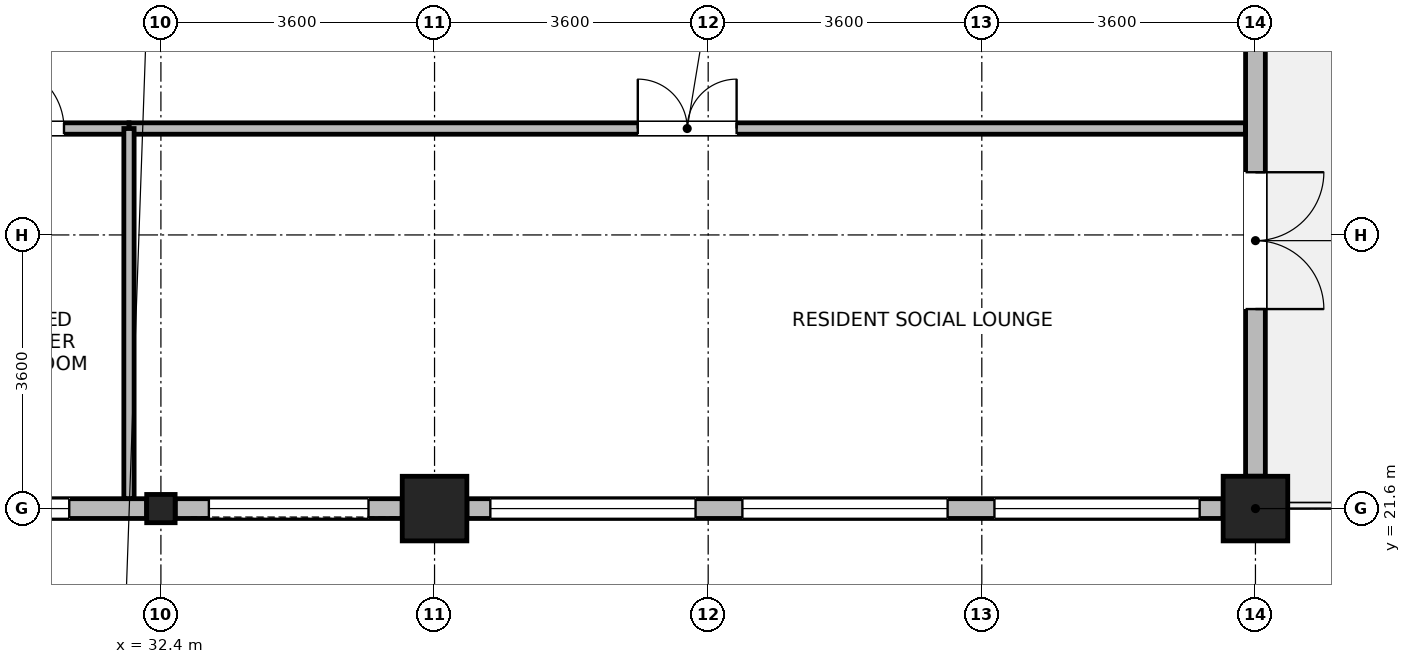
"""IFC4 building model, lengths in metres.
Left out: names, types, materials, properties, quantities, classifications, styles, units other than length and angle.
Written with IfcOpenShell. Run it as: python <this file> out.ifc"""

import sys

from ifc_helpers import new_model, si_unit, direction, frame, frame_2d, origin, origin_2d, place, context, subcontext, project, spatial, rectangle, i_section, extrude, source, transform, mapped, element, fill, save


model = new_model("IFC4")
c1 = context("Model", 3, precision=1e-05, world=origin(), true_north=direction((0.0, 1.0)))
c2 = subcontext(c1, "Body", "Model", "MODEL_VIEW")
j1 = project(units=[si_unit("LENGTHUNIT", "METRE"), si_unit("PLANEANGLEUNIT", "RADIAN")], contexts=[c1])
p1 = place(None, origin())
s1 = spatial("IfcSite", under=j1, at=p1, CompositionType="ELEMENT")
p2 = place(p1, origin())
s2 = spatial("IfcBuilding", under=s1, at=p2, CompositionType="ELEMENT")
p3 = place(p2, frame((0.0, 0.0, 249.9)))
s3 = spatial("IfcBuildingStorey", under=s2, at=p3, CompositionType="ELEMENT", Elevation=249.9)
m1 = source(origin(), c2, "Body", "SweptSolid", [
    extrude(rectangle(XDim=0.85, YDim=0.85, at=origin_2d()), origin(), (0.0, 0.0, 1.0), 3.7),
])
for number, where, z_axis, x_axis in (
    (1, (36.0, 21.6, 0.0), (0.0, 0.0, 1.0), (1.0, 0.0, 0.0)),
    (2, (46.8, 21.6, 0.0), (0.0, 0.0, 1.0), (1.0, 0.0, 0.0)),
):
    element("IfcColumn", number, at=place(p3, frame(where, z_axis=z_axis, x_axis=x_axis)), inside=s3, PredefinedType="COLUMN", context=c2, shape_type="MappedRepresentation", body=[
        mapped(m1, transform((0.0, 0.0, 0.0), x_axis=(1.0, 0.0, 0.0), y_axis=(0.0, 1.0, 0.0), z_axis=(0.0, 0.0, 1.0), scale=1.0)),
    ])
m2 = source(origin(), c2, "Body", "SweptSolid", [
    extrude(i_section(OverallWidth=0.374, OverallDepth=0.372, WebThickness=0.015, FlangeThickness=0.026, FilletRadius=0.015, at=origin_2d()), origin(), (0.0, 0.0, 1.0), 3.7),
])
p4 = place(p3, frame((32.4, 21.6, 0.0), z_axis=(0.0, 0.0, 1.0), x_axis=(1.0, 0.0, 0.0)))
e3 = element("IfcColumn", 3, at=p4, inside=s3, PredefinedType="COLUMN", context=c2, shape_type="MappedRepresentation", body=[
    mapped(m2, transform((0.0, 0.0, 0.0), x_axis=(1.0, 0.0, 0.0), y_axis=(0.0, 1.0, 0.0), z_axis=(0.0, 0.0, 1.0), scale=1.0)),
])
p5 = place(p3, frame((32.212, 21.6, 0.0), z_axis=(0.0, 0.0, 1.0), x_axis=(-1.0, 0.0, 0.0)))
e4 = element("IfcWall", 4, at=p5, inside=s3, PredefinedType="STANDARD", context=c2, shape_type="SweptSolid", body=[
    extrude(rectangle(XDim=2.986, YDim=0.26, at=frame_2d((1.493, 0.0))), origin(), (0.0, 0.0, 1.0), 3.055),
])
p6 = place(p5, frame((1.018, 0.0, 0.85)))
e5 = element("IfcOpeningElement", 5, at=p6, cuts=e4, PredefinedType="OPENING", context=c2, shape_type="SweptSolid", body=[
    extrude(rectangle(XDim=0.95, YDim=1.75, at=frame_2d((0.475, 0.875))), frame((0.0, 0.14, 0.0), z_axis=(0.0, -1.0, 0.0), x_axis=(1.0, 0.0, 0.0)), (0.0, 0.0, 1.0), 0.28),
])
p7 = place(p3, frame((35.574, 21.6, 0.0), z_axis=(0.0, 0.0, 1.0), x_axis=(-1.0, 0.0, 0.0)))
e6 = element("IfcWall", 6, at=p7, inside=s3, PredefinedType="STANDARD", context=c2, shape_type="SweptSolid", body=[
    extrude(rectangle(XDim=2.986, YDim=0.26, at=frame_2d((1.493, 0.0))), origin(), (0.0, 0.0, 1.0), 3.055),
])
p8 = place(p7, frame((0.443, 0.0, 0.85)))
e7 = element("IfcOpeningElement", 7, at=p8, cuts=e6, PredefinedType="OPENING", context=c2, shape_type="SweptSolid", body=[
    extrude(rectangle(XDim=2.1, YDim=1.95, at=frame_2d((1.05, 0.975))), frame((0.0, 0.14, 0.0), z_axis=(0.0, -1.0, 0.0), x_axis=(1.0, 0.0, 0.0)), (0.0, 0.0, 1.0), 0.28),
])
p9 = place(p3, frame((46.374, 21.6, 0.0), z_axis=(0.0, 0.0, 1.0), x_axis=(-1.0, 0.0, 0.0)))
e8 = element("IfcWall", 8, at=p9, inside=s3, PredefinedType="STANDARD", context=c2, shape_type="SweptSolid", body=[
    extrude(rectangle(XDim=9.948, YDim=0.26, at=frame_2d((4.974, 0.0))), origin(), (0.0, 0.0, 1.0), 3.055),
])
p10 = place(p9, frame((0.308, 0.0, 0.85)))
e9 = element("IfcOpeningElement", 9, at=p10, cuts=e8, PredefinedType="OPENING", context=c2, shape_type="SweptSolid", body=[
    extrude(rectangle(XDim=2.7, YDim=2.05, at=frame_2d((1.35, 1.025))), frame((0.0, 0.14, 0.0), z_axis=(0.0, -1.0, 0.0), x_axis=(1.0, 0.0, 0.0)), (0.0, 0.0, 1.0), 0.28),
])
p11 = place(p9, frame((3.624, 0.0, 0.85)))
e10 = element("IfcOpeningElement", 10, at=p11, cuts=e8, PredefinedType="OPENING", context=c2, shape_type="SweptSolid", body=[
    extrude(rectangle(XDim=2.7, YDim=2.05, at=frame_2d((1.35, 1.025))), frame((0.0, 0.14, 0.0), z_axis=(0.0, -1.0, 0.0), x_axis=(1.0, 0.0, 0.0)), (0.0, 0.0, 1.0), 0.28),
])
p12 = place(p9, frame((6.94, 0.0, 0.85)))
e11 = element("IfcOpeningElement", 11, at=p12, cuts=e8, PredefinedType="OPENING", context=c2, shape_type="SweptSolid", body=[
    extrude(rectangle(XDim=2.7, YDim=2.05, at=frame_2d((1.35, 1.025))), frame((0.0, 0.14, 0.0), z_axis=(0.0, -1.0, 0.0), x_axis=(1.0, 0.0, 0.0)), (0.0, 0.0, 1.0), 0.28),
])
p13 = place(p3, frame((46.8, 28.224, 0.0), z_axis=(0.0, 0.0, 1.0), x_axis=(0.0, -1.0, 0.0)))
e12 = element("IfcWall", 12, at=p13, inside=s3, PredefinedType="STANDARD", context=c2, shape_type="SweptSolid", body=[
    extrude(rectangle(XDim=6.198, YDim=0.26, at=frame_2d((3.099, 0.0))), origin(), (0.0, 0.0, 1.0), 3.055),
])
p14 = place(p13, frame((2.199, 0.0, 0.0)))
e13 = element("IfcOpeningElement", 13, at=p14, cuts=e12, PredefinedType="OPENING", context=c2, shape_type="SweptSolid", body=[
    extrude(rectangle(XDim=1.8, YDim=2.2, at=frame_2d((0.9, 1.1))), frame((0.0, 0.14, 0.0), z_axis=(0.0, -1.0, 0.0), x_axis=(1.0, 0.0, 0.0)), (0.0, 0.0, 1.0), 0.28),
])
p15 = place(p3, frame((31.98, 26.6, 0.0), z_axis=(0.0, 0.0, 1.0), x_axis=(1.0, 0.0, 0.0)))
e14 = element("IfcWall", 14, at=p15, inside=s3, PredefinedType="PARTITIONING", context=c2, shape_type="SweptSolid", body=[
    extrude(rectangle(XDim=14.688, YDim=0.15, at=frame_2d((7.344, 0.0))), origin(), (0.0, 0.0, 1.0), 3.455),
])
p16 = place(p15, frame((6.694, 0.0, 0.0)))
e15 = element("IfcOpeningElement", 15, at=p16, cuts=e14, PredefinedType="OPENING", context=c2, shape_type="SweptSolid", body=[
    extrude(rectangle(XDim=1.3, YDim=2.12, at=frame_2d((0.65, 1.06))), frame((0.0, 0.085, 0.0), z_axis=(0.0, -1.0, 0.0), x_axis=(1.0, 0.0, 0.0)), (0.0, 0.0, 1.0), 0.17),
])
p17 = place(p3, frame((29.42, 26.6, 0.0), z_axis=(0.0, 0.0, 1.0), x_axis=(1.0, 0.0, 0.0)))
e16 = element("IfcWall", 16, at=p17, inside=s3, PredefinedType="PARTITIONING", context=c2, shape_type="SweptSolid", body=[
    extrude(rectangle(XDim=2.56, YDim=0.15, at=frame_2d((1.28, 0.0))), origin(), (0.0, 0.0, 1.0), 3.455),
])
p18 = place(p17, frame((0.855, 0.0, 0.0)))
e17 = element("IfcOpeningElement", 17, at=p18, cuts=e16, PredefinedType="OPENING", context=c2, shape_type="SweptSolid", body=[
    extrude(rectangle(XDim=0.85, YDim=2.04, at=frame_2d((0.425, 1.02))), frame((0.0, 0.085, 0.0), z_axis=(0.0, -1.0, 0.0), x_axis=(1.0, 0.0, 0.0)), (0.0, 0.0, 1.0), 0.17),
])
p19 = place(p3, frame((31.98, 21.732, 0.0), z_axis=(0.0, 0.0, 1.0), x_axis=(0.0, 1.0, 0.0)))
e18 = element("IfcWall", 18, at=p19, inside=s3, PredefinedType="PARTITIONING", context=c2, shape_type="SweptSolid", body=[
    extrude(rectangle(XDim=4.868, YDim=0.135, at=frame_2d((2.434, 0.0))), origin(), (0.0, 0.0, 1.0), 3.455),
])
p20 = place(p6, origin())
e19 = element("IfcWindow", 19, at=p20, inside=s3, PartitioningType="SINGLE_PANEL", PredefinedType="WINDOW", context=c2, shape_type="SweptSolid", body=[
    extrude(rectangle(XDim=0.95, YDim=1.75, at=frame_2d((0.475, 0.875))), frame((0.0, 0.03, 0.0), z_axis=(0.0, -1.0, 0.0), x_axis=(1.0, 0.0, 0.0)), (0.0, 0.0, 1.0), 0.06),
])
fill(e5, e19)
p21 = place(p8, origin())
e20 = element("IfcWindow", 20, at=p21, inside=s3, PartitioningType="SINGLE_PANEL", PredefinedType="WINDOW", context=c2, shape_type="SweptSolid", body=[
    extrude(rectangle(XDim=2.1, YDim=1.95, at=frame_2d((1.05, 0.975))), frame((0.0, 0.03, 0.0), z_axis=(0.0, -1.0, 0.0), x_axis=(1.0, 0.0, 0.0)), (0.0, 0.0, 1.0), 0.06),
])
fill(e7, e20)
p22 = place(p10, origin())
e21 = element("IfcWindow", 21, at=p22, inside=s3, PartitioningType="SINGLE_PANEL", PredefinedType="WINDOW", context=c2, shape_type="SweptSolid", body=[
    extrude(rectangle(XDim=2.7, YDim=2.05, at=frame_2d((1.35, 1.025))), frame((0.0, 0.03, 0.0), z_axis=(0.0, -1.0, 0.0), x_axis=(1.0, 0.0, 0.0)), (0.0, 0.0, 1.0), 0.06),
])
fill(e9, e21)
p23 = place(p11, origin())
e22 = element("IfcWindow", 22, at=p23, inside=s3, PartitioningType="SINGLE_PANEL", PredefinedType="WINDOW", context=c2, shape_type="SweptSolid", body=[
    extrude(rectangle(XDim=2.7, YDim=2.05, at=frame_2d((1.35, 1.025))), frame((0.0, 0.03, 0.0), z_axis=(0.0, -1.0, 0.0), x_axis=(1.0, 0.0, 0.0)), (0.0, 0.0, 1.0), 0.06),
])
fill(e10, e22)
p24 = place(p12, origin())
e23 = element("IfcWindow", 23, at=p24, inside=s3, PartitioningType="SINGLE_PANEL", PredefinedType="WINDOW", context=c2, shape_type="SweptSolid", body=[
    extrude(rectangle(XDim=2.7, YDim=2.05, at=frame_2d((1.35, 1.025))), frame((0.0, 0.03, 0.0), z_axis=(0.0, -1.0, 0.0), x_axis=(1.0, 0.0, 0.0)), (0.0, 0.0, 1.0), 0.06),
])
fill(e11, e23)
p25 = place(p14, origin())
e24 = element("IfcDoor", 24, at=p25, inside=s3, OperationType="DOUBLE_DOOR_SINGLE_SWING", PredefinedType="DOOR", context=c2, shape_type="SweptSolid", body=[
    extrude(rectangle(XDim=1.8, YDim=2.2, at=frame_2d((0.9, 1.1))), frame((0.0, 0.025, 0.0), z_axis=(0.0, -1.0, 0.0), x_axis=(1.0, 0.0, 0.0)), (0.0, 0.0, 1.0), 0.05),
])
fill(e13, e24)
p26 = place(p16, origin())
e25 = element("IfcDoor", 25, at=p26, inside=s3, OperationType="DOUBLE_DOOR_SINGLE_SWING", PredefinedType="DOOR", context=c2, shape_type="SweptSolid", body=[
    extrude(rectangle(XDim=1.3, YDim=2.12, at=frame_2d((0.65, 1.06))), frame((0.0, 0.025, 0.0), z_axis=(0.0, -1.0, 0.0), x_axis=(1.0, 0.0, 0.0)), (0.0, 0.0, 1.0), 0.05),
])
fill(e15, e25)
p27 = place(p18, origin())
e26 = element("IfcDoor", 26, at=p27, inside=s3, OperationType="SINGLE_SWING_LEFT", PredefinedType="DOOR", context=c2, shape_type="SweptSolid", body=[
    extrude(rectangle(XDim=0.85, YDim=2.04, at=frame_2d((0.425, 1.02))), frame((0.0, 0.025, 0.0), z_axis=(0.0, -1.0, 0.0), x_axis=(1.0, 0.0, 0.0)), (0.0, 0.0, 1.0), 0.05),
])
fill(e17, e26)
save(model, sys.argv[1])
